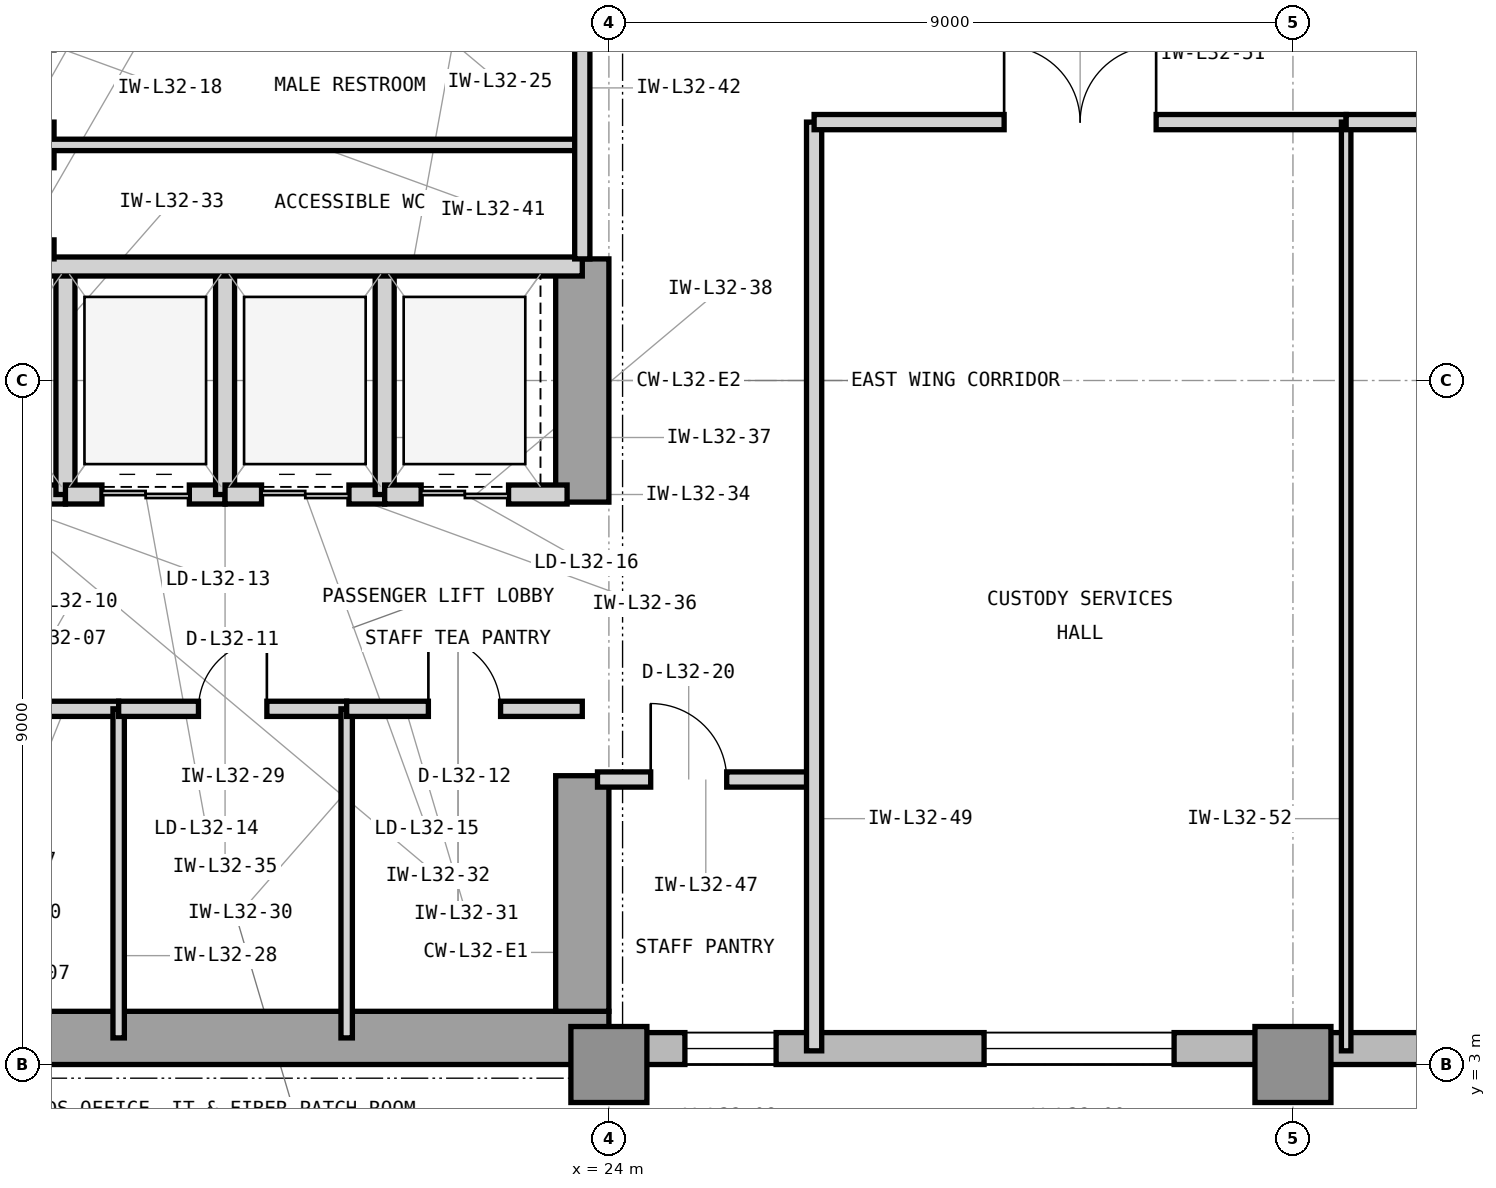
"""IFC4 building model, lengths in metres.
Left out: names, types, materials, properties, quantities, classifications, styles, units other than length and angle.
Written with IfcOpenShell. Run it as: python <this file> out.ifc"""

import sys

from ifc_helpers import new_model, si_unit, direction, frame, frame_2d, origin, origin_2d, place, context, subcontext, project, spatial, rectangle, extrude, element, fill, save


model = new_model("IFC4")
c1 = context("Model", 3, precision=1e-05, world=origin(), true_north=direction((0.0, 1.0)))
c2 = subcontext(c1, "Body", "Model", "MODEL_VIEW")
j1 = project(units=[si_unit("LENGTHUNIT", "METRE"), si_unit("PLANEANGLEUNIT", "RADIAN")], contexts=[c1])
p1 = place(None, origin())
s1 = spatial("IfcSite", under=j1, at=p1, CompositionType="ELEMENT")
p2 = place(p1, origin())
s2 = spatial("IfcBuilding", under=s1, at=p2, CompositionType="ELEMENT")
p3 = place(p2, frame((0.0, 0.0, 136.2)))
s3 = spatial("IfcBuildingStorey", under=s2, at=p3, CompositionType="ELEMENT", Elevation=136.2)
p4 = place(p3, frame((7.475, 3.35, 0.0), z_axis=(0.0, 0.0, 1.0), x_axis=(1.0, 0.0, 0.0)))
e1 = element("IfcWall", 1, at=p4, inside=s3, PredefinedType="SHEAR", context=c2, shape_type="SweptSolid", body=[
    extrude(rectangle(XDim=16.525, YDim=0.7, at=frame_2d((8.262, 0.0))), origin(), (0.0, 0.0, 1.0), 3.9),
])
p5 = place(p3, frame((23.65, 3.7, 0.0), z_axis=(0.0, 0.0, 1.0), x_axis=(0.0, 1.0, 0.0)))
e2 = element("IfcWall", 2, at=p5, inside=s3, PredefinedType="SHEAR", context=c2, shape_type="SweptSolid", body=[
    extrude(rectangle(XDim=3.1, YDim=0.7, at=frame_2d((1.55, 0.0))), origin(), (0.0, 0.0, 1.0), 3.9),
])
p6 = place(p3, frame((23.65, 10.4, 0.0), z_axis=(0.0, 0.0, 1.0), x_axis=(0.0, 1.0, 0.0)))
e3 = element("IfcWall", 3, at=p6, inside=s3, PredefinedType="SHEAR", context=c2, shape_type="SweptSolid", body=[
    extrude(rectangle(XDim=3.2, YDim=0.7, at=frame_2d((1.6, 0.0))), origin(), (0.0, 0.0, 1.0), 3.9),
])
for number, where, z_axis, x_axis in (
    (4, (24.0, 3.0, 0.0), (0.0, 0.0, 1.0), (1.0, 0.0, 0.0)),
    (5, (33.0, 3.0, 0.0), (0.0, 0.0, 1.0), (1.0, 0.0, 0.0)),
):
    element("IfcColumn", number, at=place(p3, frame(where, z_axis=z_axis, x_axis=x_axis)), inside=s3, PredefinedType="COLUMN", context=c2, shape_type="SweptSolid", body=[
        extrude(rectangle(XDim=1.0, YDim=1.0, at=origin_2d()), origin(), (0.0, 0.0, 1.0), 3.9),
    ])
p7 = place(p3, frame((23.9, 3.21, 0.0), z_axis=(0.0, 0.0, 1.0), x_axis=(1.0, 0.0, 0.0)))
e6 = element("IfcWall", 6, at=p7, inside=s3, PredefinedType="STANDARD", context=c2, shape_type="SweptSolid", body=[
    extrude(rectangle(XDim=34.5, YDim=0.42, at=frame_2d((17.25, 0.0))), origin(), (0.0, 0.0, 1.0), 3.7),
])
p8 = place(p7, frame((11.071, 0.0, 0.85)))
e7 = element("IfcOpeningElement", 7, at=p8, cuts=e6, PredefinedType="OPENING", context=c2, shape_type="SweptSolid", body=[
    extrude(rectangle(XDim=2.5, YDim=2.25, at=frame_2d((1.25, 1.125))), frame((0.0, 0.22, 0.0), z_axis=(0.0, -1.0, 0.0), x_axis=(1.0, 0.0, 0.0)), (0.0, 0.0, 1.0), 0.44),
])
p9 = place(p7, frame((1.1, 0.0, 0.85)))
e8 = element("IfcOpeningElement", 8, at=p9, cuts=e6, PredefinedType="OPENING", context=c2, shape_type="SweptSolid", body=[
    extrude(rectangle(XDim=1.2, YDim=2.25, at=frame_2d((0.6, 1.125))), frame((0.0, 0.22, 0.0), z_axis=(0.0, -1.0, 0.0), x_axis=(1.0, 0.0, 0.0)), (0.0, 0.0, 1.0), 0.44),
])
p10 = place(p7, frame((5.036, 0.0, 0.85)))
e9 = element("IfcOpeningElement", 9, at=p10, cuts=e6, PredefinedType="OPENING", context=c2, shape_type="SweptSolid", body=[
    extrude(rectangle(XDim=2.5, YDim=2.25, at=frame_2d((1.25, 1.125))), frame((0.0, 0.22, 0.0), z_axis=(0.0, -1.0, 0.0), x_axis=(1.0, 0.0, 0.0)), (0.0, 0.0, 1.0), 0.44),
])
p11 = place(p7, frame((19.786, 0.0, 0.85)))
e10 = element("IfcOpeningElement", 10, at=p11, cuts=e6, PredefinedType="OPENING", context=c2, shape_type="SweptSolid", body=[
    extrude(rectangle(XDim=2.5, YDim=2.25, at=frame_2d((1.25, 1.125))), frame((0.0, 0.22, 0.0), z_axis=(0.0, -1.0, 0.0), x_axis=(1.0, 0.0, 0.0)), (0.0, 0.0, 1.0), 0.44),
])
p12 = place(p7, frame((25.086, 0.0, 0.85)))
e11 = element("IfcOpeningElement", 11, at=p12, cuts=e6, PredefinedType="OPENING", context=c2, shape_type="SweptSolid", body=[
    extrude(rectangle(XDim=1.2, YDim=2.25, at=frame_2d((0.6, 1.125))), frame((0.0, 0.22, 0.0), z_axis=(0.0, -1.0, 0.0), x_axis=(1.0, 0.0, 0.0)), (0.0, 0.0, 1.0), 0.44),
])
p13 = place(p3, frame((14.7, 7.68, 0.0), z_axis=(0.0, 0.0, 1.0), x_axis=(1.0, 0.0, 0.0)))
e12 = element("IfcWall", 12, at=p13, inside=s3, PredefinedType="PARTITIONING", context=c2, shape_type="SweptSolid", body=[
    extrude(rectangle(XDim=2.85, YDim=0.2, at=frame_2d((1.425, 0.0))), origin(), (0.0, 0.0, 1.0), 3.69),
])
p14 = place(p13, frame((0.925, 0.0, 0.0)))
e13 = element("IfcOpeningElement", 13, at=p14, cuts=e12, PredefinedType="OPENING", context=c2, shape_type="SweptSolid", body=[
    extrude(rectangle(XDim=1.0, YDim=2.15, at=frame_2d((0.5, 1.075))), frame((0.0, 0.11, 0.0), z_axis=(0.0, -1.0, 0.0), x_axis=(1.0, 0.0, 0.0)), (0.0, 0.0, 1.0), 0.22),
])
p15 = place(p3, frame((17.55, 3.35, 0.0), z_axis=(0.0, 0.0, 1.0), x_axis=(0.0, 1.0, 0.0)))
e14 = element("IfcWall", 14, at=p15, inside=s3, PredefinedType="PARTITIONING", context=c2, shape_type="SweptSolid", body=[
    extrude(rectangle(XDim=4.33, YDim=0.15, at=frame_2d((2.165, 0.0))), origin(), (0.0, 0.0, 1.0), 3.69),
])
p16 = place(p3, frame((17.55, 7.68, 0.0), z_axis=(0.0, 0.0, 1.0), x_axis=(1.0, 0.0, 0.0)))
e15 = element("IfcWall", 15, at=p16, inside=s3, PredefinedType="PARTITIONING", context=c2, shape_type="SweptSolid", body=[
    extrude(rectangle(XDim=3.0, YDim=0.2, at=frame_2d((1.5, 0.0))), origin(), (0.0, 0.0, 1.0), 3.69),
])
p17 = place(p16, frame((1.05, 0.0, 0.0)))
e16 = element("IfcOpeningElement", 16, at=p17, cuts=e15, PredefinedType="OPENING", context=c2, shape_type="SweptSolid", body=[
    extrude(rectangle(XDim=0.9, YDim=2.1, at=frame_2d((0.45, 1.05))), frame((0.0, 0.11, 0.0), z_axis=(0.0, -1.0, 0.0), x_axis=(1.0, 0.0, 0.0)), (0.0, 0.0, 1.0), 0.22),
])
p18 = place(p3, frame((20.55, 3.35, 0.0), z_axis=(0.0, 0.0, 1.0), x_axis=(0.0, 1.0, 0.0)))
e17 = element("IfcWall", 17, at=p18, inside=s3, PredefinedType="PARTITIONING", context=c2, shape_type="SweptSolid", body=[
    extrude(rectangle(XDim=4.33, YDim=0.15, at=frame_2d((2.165, 0.0))), origin(), (0.0, 0.0, 1.0), 3.69),
])
p19 = place(p3, frame((20.55, 7.68, 0.0), z_axis=(0.0, 0.0, 1.0), x_axis=(1.0, 0.0, 0.0)))
e18 = element("IfcWall", 18, at=p19, inside=s3, PredefinedType="PARTITIONING", context=c2, shape_type="SweptSolid", body=[
    extrude(rectangle(XDim=3.1, YDim=0.2, at=frame_2d((1.55, 0.0))), origin(), (0.0, 0.0, 1.0), 3.69),
])
p20 = place(p19, frame((1.075, 0.0, 0.0)))
e19 = element("IfcOpeningElement", 19, at=p20, cuts=e18, PredefinedType="OPENING", context=c2, shape_type="SweptSolid", body=[
    extrude(rectangle(XDim=0.95, YDim=2.1, at=frame_2d((0.475, 1.05))), frame((0.0, 0.11, 0.0), z_axis=(0.0, -1.0, 0.0), x_axis=(1.0, 0.0, 0.0)), (0.0, 0.0, 1.0), 0.22),
])
p21 = place(p3, frame((14.7, 10.5, 0.0), z_axis=(0.0, 0.0, 1.0), x_axis=(1.0, 0.0, 0.0)))
e20 = element("IfcWall", 20, at=p21, inside=s3, PredefinedType="PARTITIONING", context=c2, shape_type="SweptSolid", body=[
    extrude(rectangle(XDim=2.15, YDim=0.25, at=frame_2d((1.075, 0.0))), origin(), (0.0, 0.0, 1.0), 3.233),
])
p22 = place(p21, frame((0.48, 0.0, 0.0)))
e21 = element("IfcOpeningElement", 21, at=p22, cuts=e20, PredefinedType="OPENING", context=c2, shape_type="SweptSolid", body=[
    extrude(rectangle(XDim=1.15, YDim=2.25, at=frame_2d((0.575, 1.125))), frame((0.0, 0.135, 0.0), z_axis=(0.0, -1.0, 0.0), x_axis=(1.0, 0.0, 0.0)), (0.0, 0.0, 1.0), 0.27),
])
p23 = place(p3, frame((16.85, 10.5, 0.0), z_axis=(0.0, 0.0, 1.0), x_axis=(0.0, 1.0, 0.0)))
e22 = element("IfcWall", 22, at=p23, inside=s3, PredefinedType="PARTITIONING", context=c2, shape_type="SweptSolid", body=[
    extrude(rectangle(XDim=3.0, YDim=0.25, at=frame_2d((1.5, 0.0))), origin(), (0.0, 0.0, 1.0), 3.69),
])
p24 = place(p3, frame((16.85, 10.5, 0.0), z_axis=(0.0, 0.0, 1.0), x_axis=(1.0, 0.0, 0.0)))
e23 = element("IfcWall", 23, at=p24, inside=s3, PredefinedType="PARTITIONING", context=c2, shape_type="SweptSolid", body=[
    extrude(rectangle(XDim=2.1, YDim=0.25, at=frame_2d((1.05, 0.0))), origin(), (0.0, 0.0, 1.0), 3.233),
])
p25 = place(p24, frame((0.48, 0.0, 0.0)))
e24 = element("IfcOpeningElement", 24, at=p25, cuts=e23, PredefinedType="OPENING", context=c2, shape_type="SweptSolid", body=[
    extrude(rectangle(XDim=1.15, YDim=2.25, at=frame_2d((0.575, 1.125))), frame((0.0, 0.135, 0.0), z_axis=(0.0, -1.0, 0.0), x_axis=(1.0, 0.0, 0.0)), (0.0, 0.0, 1.0), 0.27),
])
p26 = place(p3, frame((18.95, 10.5, 0.0), z_axis=(0.0, 0.0, 1.0), x_axis=(0.0, 1.0, 0.0)))
e25 = element("IfcWall", 25, at=p26, inside=s3, PredefinedType="PARTITIONING", context=c2, shape_type="SweptSolid", body=[
    extrude(rectangle(XDim=3.0, YDim=0.25, at=frame_2d((1.5, 0.0))), origin(), (0.0, 0.0, 1.0), 3.69),
])
p27 = place(p3, frame((18.95, 10.5, 0.0), z_axis=(0.0, 0.0, 1.0), x_axis=(1.0, 0.0, 0.0)))
e26 = element("IfcWall", 26, at=p27, inside=s3, PredefinedType="PARTITIONING", context=c2, shape_type="SweptSolid", body=[
    extrude(rectangle(XDim=2.1, YDim=0.25, at=frame_2d((1.05, 0.0))), origin(), (0.0, 0.0, 1.0), 3.233),
])
p28 = place(p27, frame((0.48, 0.0, 0.0)))
e27 = element("IfcOpeningElement", 27, at=p28, cuts=e26, PredefinedType="OPENING", context=c2, shape_type="SweptSolid", body=[
    extrude(rectangle(XDim=1.15, YDim=2.25, at=frame_2d((0.575, 1.125))), frame((0.0, 0.135, 0.0), z_axis=(0.0, -1.0, 0.0), x_axis=(1.0, 0.0, 0.0)), (0.0, 0.0, 1.0), 0.27),
])
p29 = place(p3, frame((21.05, 10.5, 0.0), z_axis=(0.0, 0.0, 1.0), x_axis=(0.0, 1.0, 0.0)))
e28 = element("IfcWall", 28, at=p29, inside=s3, PredefinedType="PARTITIONING", context=c2, shape_type="SweptSolid", body=[
    extrude(rectangle(XDim=3.0, YDim=0.25, at=frame_2d((1.5, 0.0))), origin(), (0.0, 0.0, 1.0), 3.69),
])
p30 = place(p3, frame((21.05, 10.5, 0.0), z_axis=(0.0, 0.0, 1.0), x_axis=(1.0, 0.0, 0.0)))
e29 = element("IfcWall", 29, at=p30, inside=s3, PredefinedType="PARTITIONING", context=c2, shape_type="SweptSolid", body=[
    extrude(rectangle(XDim=2.4, YDim=0.25, at=frame_2d((1.2, 0.0))), origin(), (0.0, 0.0, 1.0), 3.233),
])
p31 = place(p30, frame((0.48, 0.0, 0.0)))
e30 = element("IfcOpeningElement", 30, at=p31, cuts=e29, PredefinedType="OPENING", context=c2, shape_type="SweptSolid", body=[
    extrude(rectangle(XDim=1.15, YDim=2.25, at=frame_2d((0.575, 1.125))), frame((0.0, 0.135, 0.0), z_axis=(0.0, -1.0, 0.0), x_axis=(1.0, 0.0, 0.0)), (0.0, 0.0, 1.0), 0.27),
])
p32 = place(p3, frame((14.7, 13.5, 0.0), z_axis=(0.0, 0.0, 1.0), x_axis=(1.0, 0.0, 0.0)))
e31 = element("IfcWall", 31, at=p32, inside=s3, PredefinedType="PARTITIONING", context=c2, shape_type="SweptSolid", body=[
    extrude(rectangle(XDim=8.95, YDim=0.25, at=frame_2d((4.475, 0.0))), origin(), (0.0, 0.0, 1.0), 3.233),
])
p33 = place(p3, frame((16.6, 13.6, 0.0), z_axis=(0.0, 0.0, 1.0), x_axis=(0.0, 1.0, 0.0)))
e32 = element("IfcWall", 32, at=p33, inside=s3, PredefinedType="PARTITIONING", context=c2, shape_type="SweptSolid", body=[
    extrude(rectangle(XDim=3.0, YDim=0.2, at=frame_2d((1.5, 0.0))), origin(), (0.0, 0.0, 1.0), 3.69),
])
p34 = place(p33, frame((0.25, 0.0, 0.0)))
e33 = element("IfcOpeningElement", 33, at=p34, cuts=e32, PredefinedType="OPENING", context=c2, shape_type="SweptSolid", body=[
    extrude(rectangle(XDim=0.95, YDim=2.1, at=frame_2d((0.475, 1.05))), frame((0.0, 0.11, 0.0), z_axis=(0.0, -1.0, 0.0), x_axis=(1.0, 0.0, 0.0)), (0.0, 0.0, 1.0), 0.22),
])
p35 = place(p33, frame((1.8, 0.0, 0.0)))
e34 = element("IfcOpeningElement", 34, at=p35, cuts=e32, PredefinedType="OPENING", context=c2, shape_type="SweptSolid", body=[
    extrude(rectangle(XDim=0.95, YDim=2.1, at=frame_2d((0.475, 1.05))), frame((0.0, 0.11, 0.0), z_axis=(0.0, -1.0, 0.0), x_axis=(1.0, 0.0, 0.0)), (0.0, 0.0, 1.0), 0.22),
])
p36 = place(p3, frame((16.6, 15.1, 0.0), z_axis=(0.0, 0.0, 1.0), x_axis=(1.0, 0.0, 0.0)))
e35 = element("IfcWall", 35, at=p36, inside=s3, PredefinedType="PARTITIONING", context=c2, shape_type="SweptSolid", body=[
    extrude(rectangle(XDim=7.05, YDim=0.15, at=frame_2d((3.525, 0.0))), origin(), (0.0, 0.0, 1.0), 3.69),
])
p37 = place(p3, frame((23.65, 13.6, 0.0), z_axis=(0.0, 0.0, 1.0), x_axis=(0.0, 1.0, 0.0)))
e36 = element("IfcWall", 36, at=p37, inside=s3, PredefinedType="PARTITIONING", context=c2, shape_type="SweptSolid", body=[
    extrude(rectangle(XDim=3.0, YDim=0.2, at=frame_2d((1.5, 0.0))), origin(), (0.0, 0.0, 1.0), 3.69),
])
p38 = place(p3, frame((23.85, 6.75, 0.0), z_axis=(0.0, 0.0, 1.0), x_axis=(1.0, 0.0, 0.0)))
e37 = element("IfcWall", 37, at=p38, inside=s3, PredefinedType="PARTITIONING", context=c2, shape_type="SweptSolid", body=[
    extrude(rectangle(XDim=2.85, YDim=0.2, at=frame_2d((1.425, 0.0))), origin(), (0.0, 0.0, 1.0), 3.69),
])
p39 = place(p38, frame((0.7, 0.0, 0.0)))
e38 = element("IfcOpeningElement", 38, at=p39, cuts=e37, PredefinedType="OPENING", context=c2, shape_type="SweptSolid", body=[
    extrude(rectangle(XDim=1.0, YDim=2.15, at=frame_2d((0.5, 1.075))), frame((0.0, 0.11, 0.0), z_axis=(0.0, -1.0, 0.0), x_axis=(1.0, 0.0, 0.0)), (0.0, 0.0, 1.0), 0.22),
])
p40 = place(p3, frame((26.7, 3.18, 0.0), z_axis=(0.0, 0.0, 1.0), x_axis=(0.0, 1.0, 0.0)))
e39 = element("IfcWall", 39, at=p40, inside=s3, PredefinedType="PARTITIONING", context=c2, shape_type="SweptSolid", body=[
    extrude(rectangle(XDim=12.22, YDim=0.2, at=frame_2d((6.11, 0.0))), origin(), (0.0, 0.0, 1.0), 3.69),
])
p41 = place(p3, frame((26.7, 15.4, 0.0), z_axis=(0.0, 0.0, 1.0), x_axis=(1.0, 0.0, 0.0)))
e40 = element("IfcWall", 40, at=p41, inside=s3, PredefinedType="PARTITIONING", context=c2, shape_type="SweptSolid", body=[
    extrude(rectangle(XDim=7.0, YDim=0.2, at=frame_2d((3.5, 0.0))), origin(), (0.0, 0.0, 1.0), 3.69),
])
p42 = place(p41, frame((2.5, 0.0, 0.0)))
e41 = element("IfcOpeningElement", 41, at=p42, cuts=e40, PredefinedType="OPENING", context=c2, shape_type="SweptSolid", body=[
    extrude(rectangle(XDim=2.0, YDim=2.5, at=frame_2d((1.0, 1.25))), frame((0.0, 0.11, 0.0), z_axis=(0.0, -1.0, 0.0), x_axis=(1.0, 0.0, 0.0)), (0.0, 0.0, 1.0), 0.22),
])
p43 = place(p3, frame((33.7, 3.18, 0.0), z_axis=(0.0, 0.0, 1.0), x_axis=(0.0, 1.0, 0.0)))
e42 = element("IfcWall", 42, at=p43, inside=s3, PredefinedType="PARTITIONING", context=c2, shape_type="SweptSolid", body=[
    extrude(rectangle(XDim=12.22, YDim=0.125, at=frame_2d((6.11, 0.0))), origin(), (0.0, 0.0, 1.0), 3.69),
])
p44 = place(p3, frame((33.7, 15.4, 0.0), z_axis=(0.0, 0.0, 1.0), x_axis=(1.0, 0.0, 0.0)))
e43 = element("IfcWall", 43, at=p44, inside=s3, PredefinedType="PARTITIONING", context=c2, shape_type="SweptSolid", body=[
    extrude(rectangle(XDim=7.5, YDim=0.2, at=frame_2d((3.75, 0.0))), origin(), (0.0, 0.0, 1.0), 3.69),
])
p45 = place(p44, frame((3.25, 0.0, 0.0)))
e44 = element("IfcOpeningElement", 44, at=p45, cuts=e43, PredefinedType="OPENING", context=c2, shape_type="SweptSolid", body=[
    extrude(rectangle(XDim=1.0, YDim=2.15, at=frame_2d((0.5, 1.075))), frame((0.0, 0.11, 0.0), z_axis=(0.0, -1.0, 0.0), x_axis=(1.0, 0.0, 0.0)), (0.0, 0.0, 1.0), 0.22),
])
p46 = place(p17, origin())
e45 = element("IfcDoor", 45, at=p46, inside=s3, OperationType="SINGLE_SWING_RIGHT", PredefinedType="TRAPDOOR", context=c2, shape_type="SweptSolid", body=[
    extrude(rectangle(XDim=0.9, YDim=2.1, at=frame_2d((0.45, 1.05))), frame((0.0, 0.025, 0.0), z_axis=(0.0, -1.0, 0.0), x_axis=(1.0, 0.0, 0.0)), (0.0, 0.0, 1.0), 0.05),
])
fill(e16, e45)
p47 = place(p20, origin())
e46 = element("IfcDoor", 46, at=p47, inside=s3, OperationType="SINGLE_SWING_LEFT", PredefinedType="DOOR", context=c2, shape_type="SweptSolid", body=[
    extrude(rectangle(XDim=0.95, YDim=2.1, at=frame_2d((0.475, 1.05))), frame((0.0, 0.025, 0.0), z_axis=(0.0, -1.0, 0.0), x_axis=(1.0, 0.0, 0.0)), (0.0, 0.0, 1.0), 0.05),
])
fill(e19, e46)
p48 = place(p25, origin())
e47 = element("IfcDoor", 47, at=p48, inside=s3, OperationType="DOUBLE_DOOR_SLIDING", PredefinedType="DOOR", context=c2, shape_type="SweptSolid", body=[
    extrude(rectangle(XDim=1.15, YDim=2.25, at=frame_2d((0.575, 1.125))), frame((0.0, 0.025, 0.0), z_axis=(0.0, -1.0, 0.0), x_axis=(1.0, 0.0, 0.0)), (0.0, 0.0, 1.0), 0.05),
])
fill(e24, e47)
p49 = place(p28, origin())
e48 = element("IfcDoor", 48, at=p49, inside=s3, OperationType="DOUBLE_DOOR_SLIDING", PredefinedType="DOOR", context=c2, shape_type="SweptSolid", body=[
    extrude(rectangle(XDim=1.15, YDim=2.25, at=frame_2d((0.575, 1.125))), frame((0.0, 0.025, 0.0), z_axis=(0.0, -1.0, 0.0), x_axis=(1.0, 0.0, 0.0)), (0.0, 0.0, 1.0), 0.05),
])
fill(e27, e48)
p50 = place(p31, origin())
e49 = element("IfcDoor", 49, at=p50, inside=s3, OperationType="DOUBLE_DOOR_SLIDING", PredefinedType="DOOR", context=c2, shape_type="SweptSolid", body=[
    extrude(rectangle(XDim=1.15, YDim=2.25, at=frame_2d((0.575, 1.125))), frame((0.0, 0.025, 0.0), z_axis=(0.0, -1.0, 0.0), x_axis=(1.0, 0.0, 0.0)), (0.0, 0.0, 1.0), 0.05),
])
fill(e30, e49)
p51 = place(p39, origin())
e50 = element("IfcDoor", 50, at=p51, inside=s3, OperationType="SINGLE_SWING_LEFT", PredefinedType="DOOR", context=c2, shape_type="SweptSolid", body=[
    extrude(rectangle(XDim=1.0, YDim=2.15, at=frame_2d((0.5, 1.075))), frame((0.0, 0.025, 0.0), z_axis=(0.0, -1.0, 0.0), x_axis=(1.0, 0.0, 0.0)), (0.0, 0.0, 1.0), 0.05),
])
fill(e38, e50)
p52 = place(p42, origin())
e51 = element("IfcDoor", 51, at=p52, inside=s3, OperationType="DOUBLE_DOOR_SINGLE_SWING", PredefinedType="DOOR", context=c2, shape_type="SweptSolid", body=[
    extrude(rectangle(XDim=2.0, YDim=2.5, at=frame_2d((1.0, 1.25))), frame((0.0, 0.025, 0.0), z_axis=(0.0, -1.0, 0.0), x_axis=(1.0, 0.0, 0.0)), (0.0, 0.0, 1.0), 0.05),
])
fill(e41, e51)
p53 = place(p9, origin())
e52 = element("IfcWindow", 52, at=p53, inside=s3, PartitioningType="SINGLE_PANEL", PredefinedType="WINDOW", context=c2, shape_type="SweptSolid", body=[
    extrude(rectangle(XDim=1.2, YDim=2.25, at=frame_2d((0.6, 1.125))), frame((0.0, 0.11, 0.0), z_axis=(0.0, -1.0, 0.0), x_axis=(1.0, 0.0, 0.0)), (0.0, 0.0, 1.0), 0.06),
])
fill(e8, e52)
p54 = place(p10, origin())
e53 = element("IfcWindow", 53, at=p54, inside=s3, PartitioningType="SINGLE_PANEL", PredefinedType="WINDOW", context=c2, shape_type="SweptSolid", body=[
    extrude(rectangle(XDim=2.5, YDim=2.25, at=frame_2d((1.25, 1.125))), frame((0.0, 0.11, 0.0), z_axis=(0.0, -1.0, 0.0), x_axis=(1.0, 0.0, 0.0)), (0.0, 0.0, 1.0), 0.06),
])
fill(e9, e53)
save(model, sys.argv[1])
